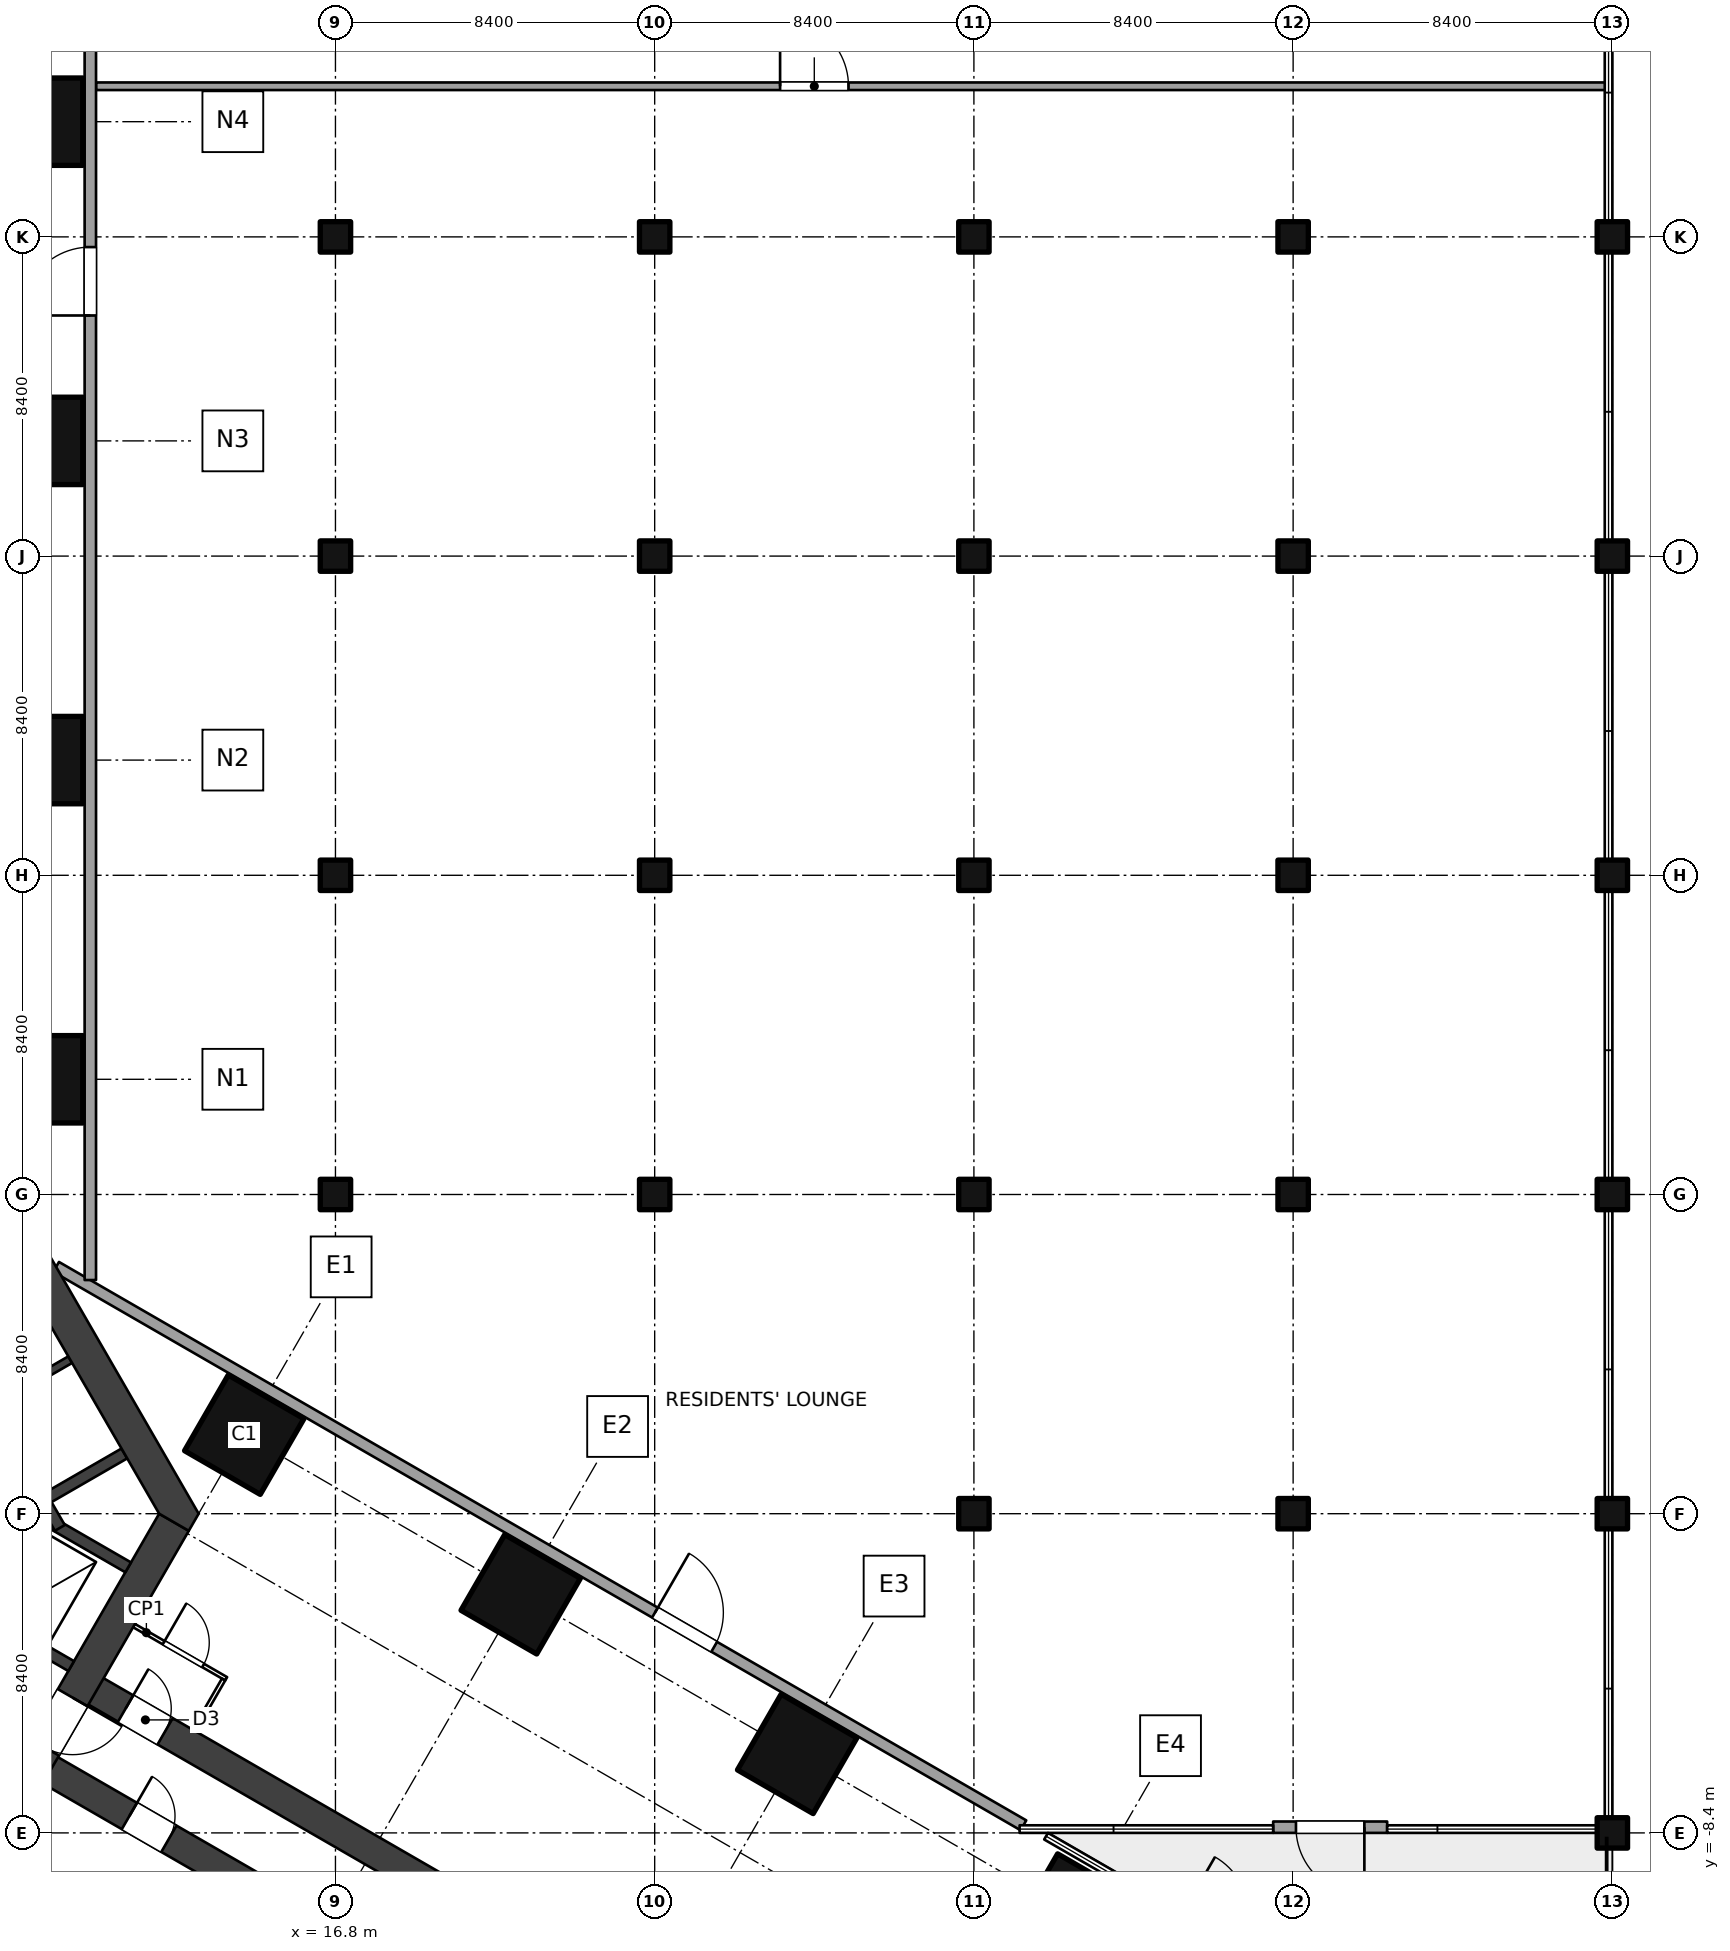
"""IFC4 building model, lengths in metres.
Left out: names, types, materials, properties, quantities, classifications, styles, units other than length and angle.
Written with IfcOpenShell. Run it as: python <this file> out.ifc"""

import sys

from ifc_helpers import new_model, si_unit, direction, frame, frame_2d, origin, origin_2d, place, context, subcontext, project, spatial, polyline, rectangle, outline, extrude, element, fill, save


model = new_model("IFC4")
c1 = context("Model", 3, precision=1e-05, world=origin(), true_north=direction((0.0, 1.0)))
c2 = subcontext(c1, "Body", "Model", "MODEL_VIEW")
j1 = project(units=[si_unit("LENGTHUNIT", "METRE"), si_unit("PLANEANGLEUNIT", "RADIAN")], contexts=[c1])
p1 = place(None, origin())
s1 = spatial("IfcSite", under=j1, at=p1, CompositionType="ELEMENT")
p2 = place(p1, origin())
s2 = spatial("IfcBuilding", under=s1, at=p2, CompositionType="ELEMENT")
p3 = place(p2, frame((0.0, 0.0, 21.0)))
s3 = spatial("IfcBuildingStorey", under=s2, at=p3, CompositionType="ELEMENT", Elevation=21.0)
for number, where, z_axis, x_axis in (
    (1, (9.0, 11.432, 0.0), (0.0, 0.0, 1.0), (1.0, 0.0, 0.0)),
    (2, (9.0, 19.832, 0.0), (0.0, 0.0, 1.0), (1.0, 0.0, 0.0)),
    (3, (9.0, 28.231, 0.0), (0.0, 0.0, 1.0), (1.0, 0.0, 0.0)),
    (4, (9.0, 36.632, 0.0), (0.0, 0.0, 1.0), (1.0, 0.0, 0.0)),
    (5, (14.4, 2.078, 0.0), (0.0, 0.0, 1.0), (-0.5, -0.866, 0.0)),
    (6, (21.675, -2.122, 0.0), (0.0, 0.0, 1.0), (-0.5, -0.866, 0.0)),
    (7, (28.949, -6.322, 0.0), (0.0, 0.0, 1.0), (-0.5, -0.866, 0.0)),
    (8, (36.224, -10.521, 0.0), (0.0, 0.0, 1.0), (-0.5, -0.866, 0.0)),
):
    element("IfcColumn", number, at=place(p3, frame(where, z_axis=z_axis, x_axis=x_axis)), inside=s3, PredefinedType="COLUMN", context=c2, shape_type="SweptSolid", body=[
        extrude(rectangle(XDim=2.3, YDim=2.3, at=origin_2d()), origin(), (0.0, 0.0, 1.0), 5.0),
    ])
for number, where, z_axis, x_axis in (
    (9, (16.8, 8.4, 0.0), (0.0, 0.0, 1.0), (1.0, 0.0, 0.0)),
    (10, (16.8, 16.8, 0.0), (0.0, 0.0, 1.0), (1.0, 0.0, 0.0)),
    (11, (16.8, 25.2, 0.0), (0.0, 0.0, 1.0), (1.0, 0.0, 0.0)),
    (12, (16.8, 33.6, 0.0), (0.0, 0.0, 1.0), (1.0, 0.0, 0.0)),
    (13, (25.2, 8.4, 0.0), (0.0, 0.0, 1.0), (1.0, 0.0, 0.0)),
    (14, (25.2, 16.8, 0.0), (0.0, 0.0, 1.0), (1.0, 0.0, 0.0)),
    (15, (25.2, 25.2, 0.0), (0.0, 0.0, 1.0), (1.0, 0.0, 0.0)),
    (16, (25.2, 33.6, 0.0), (0.0, 0.0, 1.0), (1.0, 0.0, 0.0)),
    (17, (33.6, 0.0, 0.0), (0.0, 0.0, 1.0), (1.0, 0.0, 0.0)),
    (18, (33.6, 8.4, 0.0), (0.0, 0.0, 1.0), (1.0, 0.0, 0.0)),
    (19, (33.6, 16.8, 0.0), (0.0, 0.0, 1.0), (1.0, 0.0, 0.0)),
    (20, (33.6, 25.2, 0.0), (0.0, 0.0, 1.0), (1.0, 0.0, 0.0)),
    (21, (33.6, 33.6, 0.0), (0.0, 0.0, 1.0), (1.0, 0.0, 0.0)),
    (22, (42.0, 0.0, 0.0), (0.0, 0.0, 1.0), (1.0, 0.0, 0.0)),
    (23, (42.0, 8.4, 0.0), (0.0, 0.0, 1.0), (1.0, 0.0, 0.0)),
    (24, (42.0, 16.8, 0.0), (0.0, 0.0, 1.0), (1.0, 0.0, 0.0)),
    (25, (42.0, 25.2, 0.0), (0.0, 0.0, 1.0), (1.0, 0.0, 0.0)),
    (26, (42.0, 33.6, 0.0), (0.0, 0.0, 1.0), (1.0, 0.0, 0.0)),
    (27, (50.4, -8.4, 0.0), (0.0, 0.0, 1.0), (1.0, 0.0, 0.0)),
    (28, (50.4, 0.0, 0.0), (0.0, 0.0, 1.0), (1.0, 0.0, 0.0)),
    (29, (50.4, 8.4, 0.0), (0.0, 0.0, 1.0), (1.0, 0.0, 0.0)),
    (30, (50.4, 16.8, 0.0), (0.0, 0.0, 1.0), (1.0, 0.0, 0.0)),
    (31, (50.4, 25.2, 0.0), (0.0, 0.0, 1.0), (1.0, 0.0, 0.0)),
    (32, (50.4, 33.6, 0.0), (0.0, 0.0, 1.0), (1.0, 0.0, 0.0)),
):
    element("IfcColumn", number, at=place(p3, frame(where, z_axis=z_axis, x_axis=x_axis)), inside=s3, PredefinedType="COLUMN", context=c2, shape_type="SweptSolid", body=[
        extrude(rectangle(XDim=0.8, YDim=0.8, at=origin_2d()), origin(), (0.0, 0.0, 1.0), 5.0),
    ])
p4 = place(p3, frame((12.551, -0.225, 0.0), z_axis=(0.0, 0.0, 1.0), x_axis=(-0.499997612506, -0.8660267822, 0.0)))
e33 = element("IfcWall", 33, at=p4, inside=s3, PredefinedType="SHEAR", context=c2, shape_type="SweptSolid", body=[
    extrude(rectangle(XDim=12.161, YDim=0.9, at=frame_2d((6.08, 0.0))), origin(), (0.0, 0.0, 1.0), 5.0),
])
p5 = place(p4, frame((5.33, 0.0, 0.0)))
e34 = element("IfcOpeningElement", 34, at=p5, cuts=e33, PredefinedType="OPENING", context=c2, shape_type="SweptSolid", body=[
    extrude(rectangle(XDim=1.5, YDim=2.1, at=frame_2d((0.75, 1.05))), frame((0.0, 0.46, 0.0), z_axis=(0.0, -1.0, 0.0), x_axis=(1.0, 0.0, 0.0)), (0.0, 0.0, 1.0), 0.92),
])
p6 = place(p3, origin())
e35 = element("IfcWall", 35, at=p6, inside=s3, PredefinedType="SHEAR", context=c2, shape_type="SweptSolid", body=[
    extrude(outline(polyline([(13.2, 0.0), (6.6, 11.432), (6.08, 11.432), (6.08, 10.531), (12.161, 0.0), (12.94, -0.45), (13.2, 0.0)])), origin(), (0.0, 0.0, 1.0), 5.0),
])
p7 = place(p3, frame((3.869, -0.559, 0.0), z_axis=(0.0, 0.0, 1.0), x_axis=(0.86602711848, -0.499997030048, 0.0)))
e36 = element("IfcWall", 36, at=p7, inside=s3, PredefinedType="SHEAR", context=c2, shape_type="SweptSolid", body=[
    extrude(rectangle(XDim=6.901, YDim=0.3, at=frame_2d((3.451, 0.0))), origin(), (0.0, 0.0, 1.0), 5.0),
])
p8 = place(p7, frame((4.85, 0.0, 0.0)))
e37 = element("IfcOpeningElement", 37, at=p8, cuts=e36, PredefinedType="OPENING", context=c2, shape_type="SweptSolid", body=[
    extrude(rectangle(XDim=1.1, YDim=2.1, at=frame_2d((0.55, 1.05))), frame((0.0, 0.16, 0.0), z_axis=(0.0, -1.0, 0.0), x_axis=(1.0, 0.0, 0.0)), (0.0, 0.0, 1.0), 0.32),
])
p9 = place(p3, frame((5.369, 2.039, 0.0), z_axis=(0.0, 0.0, 1.0), x_axis=(0.86602711848, -0.499997030048, 0.0)))
e38 = element("IfcWall", 38, at=p9, inside=s3, PredefinedType="SHEAR", context=c2, shape_type="SweptSolid", body=[
    extrude(rectangle(XDim=6.901, YDim=0.3, at=frame_2d((3.451, 0.0))), origin(), (0.0, 0.0, 1.0), 5.0),
])
p10 = place(p3, frame((4.45, 8.455, 0.0), z_axis=(0.0, 0.0, 1.0), x_axis=(0.500002290144, -0.866024081565, 0.0)))
e39 = element("IfcWall", 39, at=p10, inside=s3, PredefinedType="SHEAR", context=c2, shape_type="SweptSolid", body=[
    extrude(rectangle(XDim=10.195, YDim=0.3, at=frame_2d((5.098, 0.0))), origin(), (0.0, 0.0, 1.0), 5.0),
])
p11 = place(p3, frame((9.254, 0.435, 0.0), z_axis=(0.0, 0.0, 1.0), x_axis=(0.866007057882, 0.500031774688, 0.0)))
e40 = element("IfcWall", 40, at=p11, inside=s3, PredefinedType="SHEAR", context=c2, shape_type="SweptSolid", body=[
    extrude(rectangle(XDim=2.3, YDim=0.3, at=frame_2d((1.15, 0.0))), origin(), (0.0, 0.0, 1.0), 5.0),
])
p12 = place(p3, frame((7.829, 2.903, 0.0), z_axis=(0.0, 0.0, 1.0), x_axis=(0.866053019151, 0.499952165731, 0.0)))
e41 = element("IfcWall", 41, at=p12, inside=s3, PredefinedType="SHEAR", context=c2, shape_type="SweptSolid", body=[
    extrude(rectangle(XDim=2.3, YDim=0.2, at=frame_2d((1.15, 0.0))), origin(), (0.0, 0.0, 1.0), 5.0),
])
p13 = place(p3, frame((10.11, -4.451, 0.0), z_axis=(0.0, 0.0, 1.0), x_axis=(0.866023348156, -0.500003560437, 0.0)))
e42 = element("IfcWall", 42, at=p13, inside=s3, PredefinedType="SHEAR", context=c2, shape_type="SweptSolid", body=[
    extrude(rectangle(XDim=36.888, YDim=0.8, at=frame_2d((18.444, 0.0))), origin(), (0.0, 0.0, 1.0), 5.0),
])
p14 = place(p13, frame((1.35, 0.0, 0.0)))
e43 = element("IfcOpeningElement", 43, at=p14, cuts=e42, PredefinedType="OPENING", context=c2, shape_type="SweptSolid", body=[
    extrude(rectangle(XDim=1.2, YDim=2.1, at=frame_2d((0.6, 1.05))), frame((0.0, 0.41, 0.0), z_axis=(0.0, -1.0, 0.0), x_axis=(1.0, 0.0, 0.0)), (0.0, 0.0, 1.0), 0.82),
])
p15 = place(p3, frame((8.91, -6.53, 0.0), z_axis=(0.0, 0.0, 1.0), x_axis=(0.866026214035, -0.499998596603, 0.0)))
e44 = element("IfcWall", 44, at=p15, inside=s3, PredefinedType="SHEAR", context=c2, shape_type="SweptSolid", body=[
    extrude(rectangle(XDim=36.888, YDim=0.8, at=frame_2d((18.444, 0.0))), origin(), (0.0, 0.0, 1.0), 5.0),
])
p16 = place(p15, frame((10.0, 0.0, 0.0)))
e45 = element("IfcOpeningElement", 45, at=p16, cuts=e44, PredefinedType="OPENING", context=c2, shape_type="SweptSolid", body=[
    extrude(rectangle(XDim=1.0, YDim=2.1, at=frame_2d((0.5, 1.05))), frame((0.0, 0.41, 0.0), z_axis=(0.0, -1.0, 0.0), x_axis=(1.0, 0.0, 0.0)), (0.0, 0.0, 1.0), 0.82),
])
p17 = place(p15, frame((2.85, 0.0, 0.0)))
e46 = element("IfcOpeningElement", 46, at=p17, cuts=e44, PredefinedType="OPENING", context=c2, shape_type="SweptSolid", body=[
    extrude(rectangle(XDim=1.2, YDim=2.1, at=frame_2d((0.6, 1.05))), frame((0.0, 0.41, 0.0), z_axis=(0.0, -1.0, 0.0), x_axis=(1.0, 0.0, 0.0)), (0.0, 0.0, 1.0), 0.82),
])
p18 = place(p3, frame((44.475, -8.25, 0.0), z_axis=(0.0, 0.0, 1.0), x_axis=(-1.0, 0.0, 0.0)))
e47 = element("IfcWall", 47, at=p18, inside=s3, PredefinedType="SOLIDWALL", context=c2, shape_type="SweptSolid", body=[
    extrude(rectangle(XDim=3.0, YDim=0.3, at=frame_2d((1.5, 0.0))), origin(), (0.0, 0.0, 1.0), 4.6),
])
p19 = place(p18, frame((0.6, 0.0, 0.0)))
e48 = element("IfcOpeningElement", 48, at=p19, cuts=e47, PredefinedType="OPENING", context=c2, shape_type="SweptSolid", body=[
    extrude(rectangle(XDim=1.8, YDim=2.4, at=frame_2d((0.9, 1.2))), frame((0.0, 0.16, 0.0), z_axis=(0.0, -1.0, 0.0), x_axis=(1.0, 0.0, 0.0)), (0.0, 0.0, 1.0), 0.32),
])
p20 = place(p3, frame((11.5, -2.945, 0.0), z_axis=(0.0, 0.0, 1.0), x_axis=(0.866034573852, -0.49998411664, 0.0)))
e49 = element("IfcWall", 49, at=p20, inside=s3, PredefinedType="PARTITIONING", context=c2, shape_type="SweptSolid", body=[
    extrude(rectangle(XDim=2.8, YDim=0.1, at=frame_2d((1.4, 0.0))), origin(), (0.0, 0.0, 1.0), 4.6),
])
p21 = place(p20, frame((0.9, 0.0, 0.0)))
e50 = element("IfcOpeningElement", 50, at=p21, cuts=e49, PredefinedType="OPENING", context=c2, shape_type="SweptSolid", body=[
    extrude(rectangle(XDim=1.2, YDim=2.1, at=frame_2d((0.6, 1.05))), frame((0.0, 0.06, 0.0), z_axis=(0.0, -1.0, 0.0), x_axis=(1.0, 0.0, 0.0)), (0.0, 0.0, 1.0), 0.12),
])
p22 = place(p3, frame((13.082, -5.705, 0.0), z_axis=(0.0, 0.0, 1.0), x_axis=(0.500086022567, 0.865975732936, 0.0)))
e51 = element("IfcWall", 51, at=p22, inside=s3, PredefinedType="PARTITIONING", context=c2, shape_type="SweptSolid", body=[
    extrude(rectangle(XDim=1.55, YDim=0.1, at=frame_2d((0.775, 0.0))), origin(), (0.0, 0.0, 1.0), 4.6),
])
p23 = place(p3, frame((10.5, 37.564, 0.0), z_axis=(0.0, 0.0, 1.0), x_axis=(1.0, 0.0, 0.0)))
e52 = element("IfcWall", 52, at=p23, inside=s3, PredefinedType="SOLIDWALL", context=c2, shape_type="SweptSolid", body=[
    extrude(rectangle(XDim=39.737, YDim=0.2, at=frame_2d((19.869, 0.0))), origin(), (0.0, 0.0, 1.0), 4.6),
])
p24 = place(p23, frame((18.0, 0.0, 0.0)))
e53 = element("IfcOpeningElement", 53, at=p24, cuts=e52, PredefinedType="OPENING", context=c2, shape_type="SweptSolid", body=[
    extrude(rectangle(XDim=1.8, YDim=2.4, at=frame_2d((0.9, 1.2))), frame((0.0, 0.11, 0.0), z_axis=(0.0, -1.0, 0.0), x_axis=(1.0, 0.0, 0.0)), (0.0, 0.0, 1.0), 0.22),
])
p25 = place(p3, frame((10.35, 6.149, 0.0), z_axis=(0.0, 0.0, 1.0), x_axis=(0.0, 1.0, 0.0)))
e54 = element("IfcWall", 54, at=p25, inside=s3, PredefinedType="SOLIDWALL", context=c2, shape_type="SweptSolid", body=[
    extrude(rectangle(XDim=41.883, YDim=0.3, at=frame_2d((20.941, 0.0))), origin(), (0.0, 0.0, 1.0), 4.6),
])
p26 = place(p25, frame((25.383, 0.0, 0.0)))
e55 = element("IfcOpeningElement", 55, at=p26, cuts=e54, PredefinedType="OPENING", context=c2, shape_type="SweptSolid", body=[
    extrude(rectangle(XDim=1.8, YDim=2.4, at=frame_2d((0.9, 1.2))), frame((0.0, 0.16, 0.0), z_axis=(0.0, -1.0, 0.0), x_axis=(1.0, 0.0, 0.0)), (0.0, 0.0, 1.0), 0.32),
])
p27 = place(p3, frame((9.45, 6.495, 0.0), z_axis=(0.0, 0.0, 1.0), x_axis=(0.866027750123, -0.499995936, 0.0)))
e56 = element("IfcWall", 56, at=p27, inside=s3, PredefinedType="SOLIDWALL", context=c2, shape_type="SweptSolid", body=[
    extrude(rectangle(XDim=29.39, YDim=0.3, at=frame_2d((14.695, 0.0))), origin(), (0.0, 0.0, 1.0), 4.6),
])
p28 = place(p27, frame((18.195, 0.0, 0.0)))
e57 = element("IfcOpeningElement", 57, at=p28, cuts=e56, PredefinedType="OPENING", context=c2, shape_type="SweptSolid", body=[
    extrude(rectangle(XDim=1.8, YDim=2.4, at=frame_2d((0.9, 1.2))), frame((0.0, 0.16, 0.0), z_axis=(0.0, -1.0, 0.0), x_axis=(1.0, 0.0, 0.0)), (0.0, 0.0, 1.0), 0.32),
])
p29 = place(p19, origin())
e58 = element("IfcDoor", 58, at=p29, inside=s3, OperationType="DOUBLE_DOOR_SINGLE_SWING", PredefinedType="DOOR", context=c2, shape_type="SweptSolid", body=[
    extrude(rectangle(XDim=1.8, YDim=2.4, at=frame_2d((0.9, 1.2))), frame((0.0, 0.025, 0.0), z_axis=(0.0, -1.0, 0.0), x_axis=(1.0, 0.0, 0.0)), (0.0, 0.0, 1.0), 0.05),
])
fill(e48, e58)
p30 = place(p5, origin())
e59 = element("IfcDoor", 59, at=p30, inside=s3, OperationType="DOUBLE_DOOR_DOUBLE_SWING", PredefinedType="DOOR", context=c2, shape_type="SweptSolid", body=[
    extrude(rectangle(XDim=1.5, YDim=2.1, at=frame_2d((0.75, 1.05))), frame((0.0, 0.025, 0.0), z_axis=(0.0, -1.0, 0.0), x_axis=(1.0, 0.0, 0.0)), (0.0, 0.0, 1.0), 0.05),
])
fill(e34, e59)
p31 = place(p14, origin())
e60 = element("IfcDoor", 60, at=p31, inside=s3, OperationType="DOUBLE_SWING_LEFT", PredefinedType="DOOR", context=c2, shape_type="SweptSolid", body=[
    extrude(rectangle(XDim=1.2, YDim=2.1, at=frame_2d((0.6, 1.05))), frame((0.0, 0.025, 0.0), z_axis=(0.0, -1.0, 0.0), x_axis=(1.0, 0.0, 0.0)), (0.0, 0.0, 1.0), 0.05),
])
fill(e43, e60)
p32 = place(p21, origin())
e61 = element("IfcDoor", 61, at=p32, inside=s3, OperationType="DOUBLE_SWING_LEFT", PredefinedType="DOOR", context=c2, shape_type="SweptSolid", body=[
    extrude(rectangle(XDim=1.2, YDim=2.1, at=frame_2d((0.6, 1.05))), frame((0.0, 0.025, 0.0), z_axis=(0.0, -1.0, 0.0), x_axis=(1.0, 0.0, 0.0)), (0.0, 0.0, 1.0), 0.05),
])
fill(e50, e61)
p33 = place(p17, origin())
e62 = element("IfcDoor", 62, at=p33, inside=s3, OperationType="DOUBLE_SWING_LEFT", PredefinedType="DOOR", context=c2, shape_type="SweptSolid", body=[
    extrude(rectangle(XDim=1.2, YDim=2.1, at=frame_2d((0.6, 1.05))), frame((0.0, 0.025, 0.0), z_axis=(0.0, -1.0, 0.0), x_axis=(1.0, 0.0, 0.0)), (0.0, 0.0, 1.0), 0.05),
])
fill(e46, e62)
p34 = place(p24, origin())
e63 = element("IfcDoor", 63, at=p34, inside=s3, OperationType="DOUBLE_DOOR_DOUBLE_SWING", PredefinedType="DOOR", context=c2, shape_type="SweptSolid", body=[
    extrude(rectangle(XDim=1.8, YDim=2.4, at=frame_2d((0.9, 1.2))), frame((0.0, 0.025, 0.0), z_axis=(0.0, -1.0, 0.0), x_axis=(1.0, 0.0, 0.0)), (0.0, 0.0, 1.0), 0.05),
])
fill(e53, e63)
p35 = place(p26, origin())
e64 = element("IfcDoor", 64, at=p35, inside=s3, OperationType="DOUBLE_DOOR_DOUBLE_SWING", PredefinedType="DOOR", context=c2, shape_type="SweptSolid", body=[
    extrude(rectangle(XDim=1.8, YDim=2.4, at=frame_2d((0.9, 1.2))), frame((0.0, 0.025, 0.0), z_axis=(0.0, -1.0, 0.0), x_axis=(1.0, 0.0, 0.0)), (0.0, 0.0, 1.0), 0.05),
])
fill(e55, e64)
p36 = place(p28, origin())
e65 = element("IfcDoor", 65, at=p36, inside=s3, OperationType="DOUBLE_DOOR_DOUBLE_SWING", PredefinedType="DOOR", context=c2, shape_type="SweptSolid", body=[
    extrude(rectangle(XDim=1.8, YDim=2.4, at=frame_2d((0.9, 1.2))), frame((0.0, 0.025, 0.0), z_axis=(0.0, -1.0, 0.0), x_axis=(1.0, 0.0, 0.0)), (0.0, 0.0, 1.0), 0.05),
])
fill(e57, e65)
save(model, sys.argv[1])
